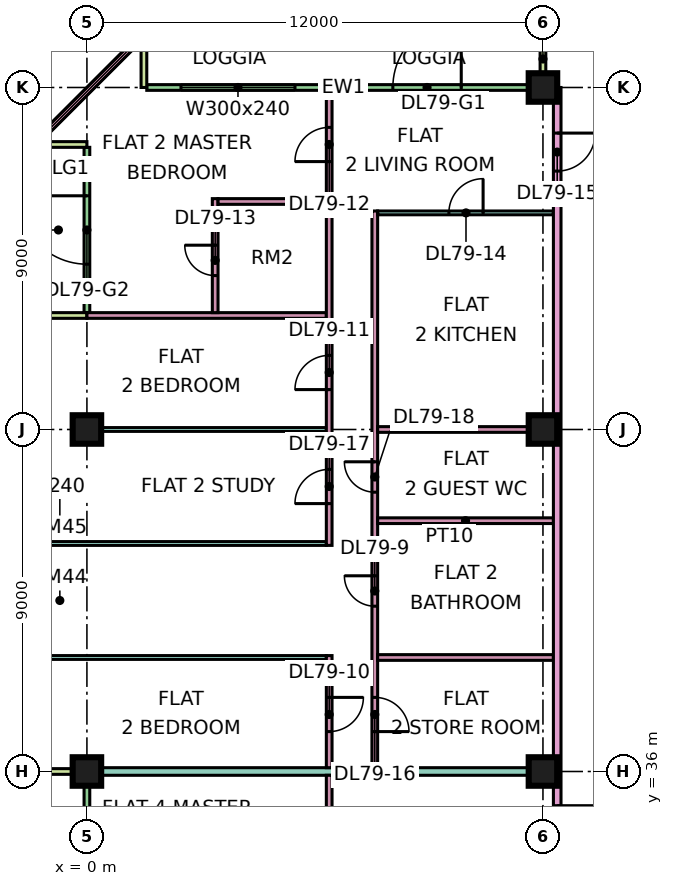
"""IFC4 building model, lengths in metres.
Left out: names, types, materials, properties, quantities, classifications, styles, units other than length and angle.
Written with IfcOpenShell. Run it as: python <this file> out.ifc"""

import sys

from ifc_helpers import new_model, si_unit, direction, frame, frame_2d, origin, origin_2d, place, context, subcontext, project, spatial, rectangle, extrude, element, fill, save


model = new_model("IFC4")
c1 = context("Model", 3, precision=1e-05, world=origin(), true_north=direction((0.0, 1.0)))
c2 = subcontext(c1, "Body", "Model", "MODEL_VIEW")
j1 = project(units=[si_unit("LENGTHUNIT", "METRE"), si_unit("PLANEANGLEUNIT", "RADIAN")], contexts=[c1])
p1 = place(None, origin())
s1 = spatial("IfcSite", under=j1, at=p1, CompositionType="ELEMENT")
p2 = place(p1, origin())
s2 = spatial("IfcBuilding", under=s1, at=p2, CompositionType="ELEMENT")
p3 = place(p2, frame((0.0, 0.0, 342.65)))
s3 = spatial("IfcBuildingStorey", under=s2, at=p3, CompositionType="ELEMENT", Elevation=342.65)
p4 = place(p3, frame((0.0, 36.0, 0.0), z_axis=(0.0, 0.0, 1.0), x_axis=(1.0, 0.0, 0.0)))
e1 = element("IfcColumn", 1, at=p4, inside=s3, PredefinedType="COLUMN", context=c2, shape_type="SweptSolid", body=[
    extrude(rectangle(XDim=0.75, YDim=0.75, at=origin_2d()), origin(), (0.0, 0.0, 1.0), 3.75),
])
p5 = place(p3, frame((0.0, 45.0, 0.0), z_axis=(0.0, 0.0, 1.0), x_axis=(1.0, 0.0, 0.0)))
e2 = element("IfcColumn", 2, at=p5, inside=s3, PredefinedType="COLUMN", context=c2, shape_type="SweptSolid", body=[
    extrude(rectangle(XDim=0.75, YDim=0.75, at=origin_2d()), origin(), (0.0, 0.0, 1.0), 3.75),
])
for number, where, z_axis, x_axis in (
    (3, (12.0, 36.0, 0.0), (0.0, 0.0, 1.0), (1.0, 0.0, 0.0)),
    (4, (12.0, 45.0, 0.0), (0.0, 0.0, 1.0), (1.0, 0.0, 0.0)),
    (5, (12.0, 54.0, 0.0), (0.0, 0.0, 1.0), (1.0, 0.0, 0.0)),
):
    element("IfcColumn", number, at=place(p3, frame(where, z_axis=z_axis, x_axis=x_axis)), inside=s3, PredefinedType="COLUMN", context=c2, shape_type="SweptSolid", body=[
        extrude(rectangle(XDim=0.75, YDim=0.75, at=origin_2d()), origin(), (0.0, 0.0, 1.0), 3.75),
    ])
p6 = place(p3, frame((11.925, 54.0, 0.0), z_axis=(0.0, 0.0, 1.0), x_axis=(-1.0, 0.0, 0.0)))
e6 = element("IfcWall", 6, at=p6, inside=s3, PredefinedType="SOLIDWALL", context=c2, shape_type="SweptSolid", body=[
    extrude(rectangle(XDim=10.35, YDim=0.15, at=frame_2d((5.175, 0.0))), origin(), (0.0, 0.0, 1.0), 3.35),
])
p7 = place(p6, frame((2.075, 0.0, 0.0)))
e7 = element("IfcOpeningElement", 7, at=p7, cuts=e6, PredefinedType="OPENING", context=c2, shape_type="SweptSolid", body=[
    extrude(rectangle(XDim=1.8, YDim=2.4, at=frame_2d((0.9, 1.2))), frame((0.0, 0.085, 0.0), z_axis=(0.0, -1.0, 0.0), x_axis=(1.0, 0.0, 0.0)), (0.0, 0.0, 1.0), 0.17),
])
p8 = place(p6, frame((6.45, 0.0, 0.45)))
e8 = element("IfcOpeningElement", 8, at=p8, cuts=e6, PredefinedType="OPENING", context=c2, shape_type="SweptSolid", body=[
    extrude(rectangle(XDim=3.0, YDim=2.4, at=frame_2d((1.5, 1.2))), frame((0.0, 0.085, 0.0), z_axis=(0.0, -1.0, 0.0), x_axis=(1.0, 0.0, 0.0)), (0.0, 0.0, 1.0), 0.17),
])
for number, where, z_axis, x_axis in (
    (9, (12.0, 55.5, 0.0), (0.0, 0.0, 1.0), (0.0, -1.0, 0.0)),
    (10, (1.5, 55.5, 0.0), (0.0, 0.0, 1.0), (0.0, -1.0, 0.0)),
):
    element("IfcWall", number, at=place(p3, frame(where, z_axis=z_axis, x_axis=x_axis)), inside=s3, PredefinedType="SOLIDWALL", context=c2, shape_type="SweptSolid", body=[
        extrude(rectangle(XDim=1.5, YDim=0.15, at=frame_2d((0.75, 0.0))), origin(), (0.0, 0.0, 1.0), 3.35),
    ])
p9 = place(p3, frame((1.553, 55.447, 0.0), z_axis=(0.0, 0.0, 1.0), x_axis=(-0.707106781187, -0.707106781187, 0.0)))
e11 = element("IfcWall", 11, at=p9, inside=s3, PredefinedType="SOLIDWALL", context=c2, shape_type="SweptSolid", body=[
    extrude(rectangle(XDim=4.243, YDim=0.15, at=frame_2d((2.121, 0.0))), origin(), (0.0, 0.0, 1.0), 3.35),
])
p10 = place(p9, frame((0.621, 0.0, 0.45)))
e12 = element("IfcOpeningElement", 12, at=p10, cuts=e11, PredefinedType="OPENING", context=c2, shape_type="SweptSolid", body=[
    extrude(rectangle(XDim=3.0, YDim=2.4, at=frame_2d((1.5, 1.2))), frame((0.0, 0.085, 0.0), z_axis=(0.0, -1.0, 0.0), x_axis=(1.0, 0.0, 0.0)), (0.0, 0.0, 1.0), 0.17),
])
p11 = place(p3, frame((0.0, 52.425, 0.0), z_axis=(0.0, 0.0, 1.0), x_axis=(0.0, -1.0, 0.0)))
e13 = element("IfcWall", 13, at=p11, inside=s3, PredefinedType="SOLIDWALL", context=c2, shape_type="SweptSolid", body=[
    extrude(rectangle(XDim=4.35, YDim=0.15, at=frame_2d((2.175, 0.0))), origin(), (0.0, 0.0, 1.0), 3.35),
])
p12 = place(p11, frame((1.275, 0.0, 0.0)))
e14 = element("IfcOpeningElement", 14, at=p12, cuts=e13, PredefinedType="OPENING", context=c2, shape_type="SweptSolid", body=[
    extrude(rectangle(XDim=1.8, YDim=2.4, at=frame_2d((0.9, 1.2))), frame((0.0, 0.085, 0.0), z_axis=(0.0, -1.0, 0.0), x_axis=(1.0, 0.0, 0.0)), (0.0, 0.0, 1.0), 0.17),
])
for number, where, z_axis, x_axis in (
    (15, (-1.5, 52.5, 0.0), (0.0, 0.0, 1.0), (1.0, 0.0, 0.0)),
    (16, (-1.5, 48.0, 0.0), (0.0, 0.0, 1.0), (1.0, 0.0, 0.0)),
):
    element("IfcWall", number, at=place(p3, frame(where, z_axis=z_axis, x_axis=x_axis)), inside=s3, PredefinedType="SOLIDWALL", context=c2, shape_type="SweptSolid", body=[
        extrude(rectangle(XDim=1.5, YDim=0.15, at=frame_2d((0.75, 0.0))), origin(), (0.0, 0.0, 1.0), 3.35),
    ])
p13 = place(p3, frame((0.0, 35.925, 0.0), z_axis=(0.0, 0.0, 1.0), x_axis=(0.0, -1.0, 0.0)))
e17 = element("IfcWall", 17, at=p13, inside=s3, PredefinedType="SOLIDWALL", context=c2, shape_type="SweptSolid", body=[
    extrude(rectangle(XDim=11.85, YDim=0.15, at=frame_2d((5.925, 0.0))), origin(), (0.0, 0.0, 1.0), 3.35),
])
p14 = place(p13, frame((2.262, 0.0, 0.0)))
e18 = element("IfcOpeningElement", 18, at=p14, cuts=e17, PredefinedType="OPENING", context=c2, shape_type="SweptSolid", body=[
    extrude(rectangle(XDim=1.8, YDim=2.4, at=frame_2d((0.9, 1.2))), frame((0.0, 0.085, 0.0), z_axis=(0.0, -1.0, 0.0), x_axis=(1.0, 0.0, 0.0)), (0.0, 0.0, 1.0), 0.17),
])
p15 = place(p13, frame((7.188, 0.0, 0.45)))
e19 = element("IfcOpeningElement", 19, at=p15, cuts=e17, PredefinedType="OPENING", context=c2, shape_type="SweptSolid", body=[
    extrude(rectangle(XDim=3.0, YDim=2.4, at=frame_2d((1.5, 1.2))), frame((0.0, 0.085, 0.0), z_axis=(0.0, -1.0, 0.0), x_axis=(1.0, 0.0, 0.0)), (0.0, 0.0, 1.0), 0.17),
])
p16 = place(p3, frame((-1.5, 36.0, 0.0), z_axis=(0.0, 0.0, 1.0), x_axis=(1.0, 0.0, 0.0)))
e20 = element("IfcWall", 20, at=p16, inside=s3, PredefinedType="SOLIDWALL", context=c2, shape_type="SweptSolid", body=[
    extrude(rectangle(XDim=1.5, YDim=0.15, at=frame_2d((0.75, 0.0))), origin(), (0.0, 0.0, 1.0), 3.35),
])
e21 = element("IfcWall", 21, at=p4, inside=s3, PredefinedType="PARTITIONING", context=c2, shape_type="SweptSolid", body=[
    extrude(rectangle(XDim=12.275, YDim=0.2, at=frame_2d((6.137, 0.0))), origin(), (0.0, 0.0, 1.0), 3.35),
])
for number, where, z_axis, x_axis in (
    (22, (-1.35, 39.0, 0.0), (0.0, 0.0, 1.0), (1.0, 0.0, 0.0)),
    (23, (-1.35, 42.0, 0.0), (0.0, 0.0, 1.0), (1.0, 0.0, 0.0)),
):
    element("IfcWall", number, at=place(p3, frame(where, z_axis=z_axis, x_axis=x_axis)), inside=s3, PredefinedType="PARTITIONING", context=c2, shape_type="SweptSolid", body=[
        extrude(rectangle(XDim=7.65, YDim=0.1, at=frame_2d((3.825, 0.0))), origin(), (0.0, 0.0, 1.0), 3.35),
    ])
e24 = element("IfcWall", 24, at=p5, inside=s3, PredefinedType="PARTITIONING", context=c2, shape_type="SweptSolid", body=[
    extrude(rectangle(XDim=6.3, YDim=0.1, at=frame_2d((3.15, 0.0))), origin(), (0.0, 0.0, 1.0), 3.35),
])
p17 = place(p3, frame((0.0, 48.0, 0.0), z_axis=(0.0, 0.0, 1.0), x_axis=(1.0, 0.0, 0.0)))
e25 = element("IfcWall", 25, at=p17, inside=s3, PredefinedType="PARTITIONING", context=c2, shape_type="SweptSolid", body=[
    extrude(rectangle(XDim=6.3, YDim=0.15, at=frame_2d((3.15, 0.0))), origin(), (0.0, 0.0, 1.0), 3.35),
])
p18 = place(p3, frame((3.375, 48.075, 0.0), z_axis=(0.0, 0.0, 1.0), x_axis=(0.0, 1.0, 0.0)))
e26 = element("IfcWall", 26, at=p18, inside=s3, PredefinedType="PARTITIONING", context=c2, shape_type="SweptSolid", body=[
    extrude(rectangle(XDim=3.0, YDim=0.15, at=frame_2d((1.5, 0.0))), origin(), (0.0, 0.0, 1.0), 3.35),
])
p19 = place(p18, frame((0.975, 0.0, 0.0)))
e27 = element("IfcOpeningElement", 27, at=p19, cuts=e26, PredefinedType="OPENING", context=c2, shape_type="SweptSolid", body=[
    extrude(rectangle(XDim=0.8, YDim=2.1, at=frame_2d((0.4, 1.05))), frame((0.0, 0.085, 0.0), z_axis=(0.0, -1.0, 0.0), x_axis=(1.0, 0.0, 0.0)), (0.0, 0.0, 1.0), 0.17),
])
p20 = place(p3, frame((3.45, 51.0, 0.0), z_axis=(0.0, 0.0, 1.0), x_axis=(1.0, 0.0, 0.0)))
e28 = element("IfcWall", 28, at=p20, inside=s3, PredefinedType="PARTITIONING", context=c2, shape_type="SweptSolid", body=[
    extrude(rectangle(XDim=2.85, YDim=0.15, at=frame_2d((1.425, 0.0))), origin(), (0.0, 0.0, 1.0), 3.35),
])
p21 = place(p3, frame((6.375, 30.075, 0.0), z_axis=(0.0, 0.0, 1.0), x_axis=(0.0, 1.0, 0.0)))
e29 = element("IfcWall", 29, at=p21, inside=s3, PredefinedType="PARTITIONING", context=c2, shape_type="SweptSolid", body=[
    extrude(rectangle(XDim=5.825, YDim=0.15, at=frame_2d((2.913, 0.0))), origin(), (0.0, 0.0, 1.0), 3.35),
])
p22 = place(p21, frame((3.975, 0.0, 0.0)))
e30 = element("IfcOpeningElement", 30, at=p22, cuts=e29, PredefinedType="OPENING", context=c2, shape_type="SweptSolid", body=[
    extrude(rectangle(XDim=0.9, YDim=2.1, at=frame_2d((0.45, 1.05))), frame((0.0, 0.085, 0.0), z_axis=(0.0, -1.0, 0.0), x_axis=(1.0, 0.0, 0.0)), (0.0, 0.0, 1.0), 0.17),
])
p23 = place(p3, frame((6.375, 36.1, 0.0), z_axis=(0.0, 0.0, 1.0), x_axis=(0.0, 1.0, 0.0)))
e31 = element("IfcWall", 31, at=p23, inside=s3, PredefinedType="PARTITIONING", context=c2, shape_type="SweptSolid", body=[
    extrude(rectangle(XDim=2.95, YDim=0.15, at=frame_2d((1.475, 0.0))), origin(), (0.0, 0.0, 1.0), 3.35),
])
p24 = place(p23, frame((0.95, 0.0, 0.0)))
e32 = element("IfcOpeningElement", 32, at=p24, cuts=e31, PredefinedType="OPENING", context=c2, shape_type="SweptSolid", body=[
    extrude(rectangle(XDim=0.9, YDim=2.1, at=frame_2d((0.45, 1.05))), frame((0.0, 0.085, 0.0), z_axis=(0.0, -1.0, 0.0), x_axis=(1.0, 0.0, 0.0)), (0.0, 0.0, 1.0), 0.17),
])
p25 = place(p3, frame((6.375, 41.95, 0.0), z_axis=(0.0, 0.0, 1.0), x_axis=(0.0, 1.0, 0.0)))
e33 = element("IfcWall", 33, at=p25, inside=s3, PredefinedType="PARTITIONING", context=c2, shape_type="SweptSolid", body=[
    extrude(rectangle(XDim=11.976, YDim=0.15, at=frame_2d((5.988, 0.0))), origin(), (0.0, 0.0, 1.0), 3.35),
])
p26 = place(p25, frame((4.1, 0.0, 0.0)))
e34 = element("IfcOpeningElement", 34, at=p26, cuts=e33, PredefinedType="OPENING", context=c2, shape_type="SweptSolid", body=[
    extrude(rectangle(XDim=0.9, YDim=2.1, at=frame_2d((0.45, 1.05))), frame((0.0, 0.085, 0.0), z_axis=(0.0, -1.0, 0.0), x_axis=(1.0, 0.0, 0.0)), (0.0, 0.0, 1.0), 0.17),
])
p27 = place(p25, frame((10.1, 0.0, 0.0)))
e35 = element("IfcOpeningElement", 35, at=p27, cuts=e33, PredefinedType="OPENING", context=c2, shape_type="SweptSolid", body=[
    extrude(rectangle(XDim=0.9, YDim=2.1, at=frame_2d((0.45, 1.05))), frame((0.0, 0.085, 0.0), z_axis=(0.0, -1.0, 0.0), x_axis=(1.0, 0.0, 0.0)), (0.0, 0.0, 1.0), 0.17),
])
p28 = place(p25, frame((1.1, 0.0, 0.0)))
e36 = element("IfcOpeningElement", 36, at=p28, cuts=e33, PredefinedType="OPENING", context=c2, shape_type="SweptSolid", body=[
    extrude(rectangle(XDim=0.9, YDim=2.1, at=frame_2d((0.45, 1.05))), frame((0.0, 0.085, 0.0), z_axis=(0.0, -1.0, 0.0), x_axis=(1.0, 0.0, 0.0)), (0.0, 0.0, 1.0), 0.17),
])
p29 = place(p3, frame((7.575, 36.1, 0.0), z_axis=(0.0, 0.0, 1.0), x_axis=(0.0, 1.0, 0.0)))
e37 = element("IfcWall", 37, at=p29, inside=s3, PredefinedType="PARTITIONING", context=c2, shape_type="SweptSolid", body=[
    extrude(rectangle(XDim=14.65, YDim=0.15, at=frame_2d((7.325, 0.0))), origin(), (0.0, 0.0, 1.0), 3.35),
])
p30 = place(p29, frame((4.25, 0.0, 0.0)))
e38 = element("IfcOpeningElement", 38, at=p30, cuts=e37, PredefinedType="OPENING", context=c2, shape_type="SweptSolid", body=[
    extrude(rectangle(XDim=0.8, YDim=2.1, at=frame_2d((0.4, 1.05))), frame((0.0, 0.085, 0.0), z_axis=(0.0, -1.0, 0.0), x_axis=(1.0, 0.0, 0.0)), (0.0, 0.0, 1.0), 0.17),
])
p31 = place(p29, frame((0.95, 0.0, 0.0)))
e39 = element("IfcOpeningElement", 39, at=p31, cuts=e37, PredefinedType="OPENING", context=c2, shape_type="SweptSolid", body=[
    extrude(rectangle(XDim=0.9, YDim=2.1, at=frame_2d((0.45, 1.05))), frame((0.0, 0.085, 0.0), z_axis=(0.0, -1.0, 0.0), x_axis=(1.0, 0.0, 0.0)), (0.0, 0.0, 1.0), 0.17),
])
p32 = place(p29, frame((7.25, 0.0, 0.0)))
e40 = element("IfcOpeningElement", 40, at=p32, cuts=e37, PredefinedType="OPENING", context=c2, shape_type="SweptSolid", body=[
    extrude(rectangle(XDim=0.8, YDim=2.1, at=frame_2d((0.4, 1.05))), frame((0.0, 0.085, 0.0), z_axis=(0.0, -1.0, 0.0), x_axis=(1.0, 0.0, 0.0)), (0.0, 0.0, 1.0), 0.17),
])
for number, where, z_axis, x_axis in (
    (41, (7.65, 39.0, 0.0), (0.0, 0.0, 1.0), (1.0, 0.0, 0.0)),
    (42, (7.65, 42.6, 0.0), (0.0, 0.0, 1.0), (1.0, 0.0, 0.0)),
    (43, (7.65, 45.0, 0.0), (0.0, 0.0, 1.0), (1.0, 0.0, 0.0)),
):
    element("IfcWall", number, at=place(p3, frame(where, z_axis=z_axis, x_axis=x_axis)), inside=s3, PredefinedType="PARTITIONING", context=c2, shape_type="SweptSolid", body=[
        extrude(rectangle(XDim=4.625, YDim=0.15, at=frame_2d((2.312, 0.0))), origin(), (0.0, 0.0, 1.0), 3.35),
    ])
p33 = place(p3, frame((7.65, 50.7, 0.0), z_axis=(0.0, 0.0, 1.0), x_axis=(1.0, 0.0, 0.0)))
e44 = element("IfcWall", 44, at=p33, inside=s3, PredefinedType="PARTITIONING", context=c2, shape_type="SweptSolid", body=[
    extrude(rectangle(XDim=4.625, YDim=0.1, at=frame_2d((2.312, 0.0))), origin(), (0.0, 0.0, 1.0), 3.35),
])
p34 = place(p33, frame((1.875, 0.0, 0.0)))
e45 = element("IfcOpeningElement", 45, at=p34, cuts=e44, PredefinedType="OPENING", context=c2, shape_type="SweptSolid", body=[
    extrude(rectangle(XDim=0.9, YDim=2.1, at=frame_2d((0.45, 1.05))), frame((0.0, 0.06, 0.0), z_axis=(0.0, -1.0, 0.0), x_axis=(1.0, 0.0, 0.0)), (0.0, 0.0, 1.0), 0.12),
])
p35 = place(p3, frame((12.375, 20.0, 0.0), z_axis=(0.0, 0.0, 1.0), x_axis=(0.0, 1.0, 0.0)))
e46 = element("IfcWall", 46, at=p35, inside=s3, PredefinedType="PARTITIONING", context=c2, shape_type="SweptSolid", body=[
    extrude(rectangle(XDim=34.0, YDim=0.2, at=frame_2d((17.0, 0.0))), origin(), (0.0, 0.0, 1.0), 3.35),
])
p36 = place(p35, frame((31.8, 0.0, 0.0)))
e47 = element("IfcOpeningElement", 47, at=p36, cuts=e46, PredefinedType="OPENING", context=c2, shape_type="SweptSolid", body=[
    extrude(rectangle(XDim=1.0, YDim=2.1, at=frame_2d((0.5, 1.05))), frame((0.0, 0.11, 0.0), z_axis=(0.0, -1.0, 0.0), x_axis=(1.0, 0.0, 0.0)), (0.0, 0.0, 1.0), 0.22),
])
p37 = place(p35, frame((0.6, 0.0, 0.0)))
e48 = element("IfcOpeningElement", 48, at=p37, cuts=e46, PredefinedType="OPENING", context=c2, shape_type="SweptSolid", body=[
    extrude(rectangle(XDim=1.2, YDim=2.1, at=frame_2d((0.6, 1.05))), frame((0.0, 0.11, 0.0), z_axis=(0.0, -1.0, 0.0), x_axis=(1.0, 0.0, 0.0)), (0.0, 0.0, 1.0), 0.22),
])
p38 = place(p35, frame((14.1, 0.0, 0.0)))
e49 = element("IfcOpeningElement", 49, at=p38, cuts=e46, PredefinedType="OPENING", context=c2, shape_type="SweptSolid", body=[
    extrude(rectangle(XDim=1.0, YDim=2.1, at=frame_2d((0.5, 1.05))), frame((0.0, 0.11, 0.0), z_axis=(0.0, -1.0, 0.0), x_axis=(1.0, 0.0, 0.0)), (0.0, 0.0, 1.0), 0.22),
])
p39 = place(p7, frame((1.8, 0.0, 0.0), z_axis=(0.0, 0.0, 1.0), x_axis=(-1.0, 0.0, 0.0)))
e50 = element("IfcDoor", 50, at=p39, inside=s3, OperationType="DOUBLE_DOOR_SINGLE_SWING", PredefinedType="DOOR", context=c2, shape_type="SweptSolid", body=[
    extrude(rectangle(XDim=1.8, YDim=2.4, at=frame_2d((0.9, 1.2))), frame((0.0, 0.025, 0.0), z_axis=(0.0, -1.0, 0.0), x_axis=(1.0, 0.0, 0.0)), (0.0, 0.0, 1.0), 0.05),
])
fill(e7, e50)
p40 = place(p8, origin())
e51 = element("IfcWindow", 51, at=p40, inside=s3, PartitioningType="SINGLE_PANEL", PredefinedType="WINDOW", context=c2, shape_type="SweptSolid", body=[
    extrude(rectangle(XDim=3.0, YDim=2.4, at=frame_2d((1.5, 1.2))), frame((0.0, 0.03, 0.0), z_axis=(0.0, -1.0, 0.0), x_axis=(1.0, 0.0, 0.0)), (0.0, 0.0, 1.0), 0.06),
])
fill(e8, e51)
p41 = place(p10, origin())
e52 = element("IfcWindow", 52, at=p41, inside=s3, PartitioningType="SINGLE_PANEL", PredefinedType="WINDOW", context=c2, shape_type="SweptSolid", body=[
    extrude(rectangle(XDim=3.0, YDim=2.4, at=frame_2d((1.5, 1.2))), frame((0.0, 0.03, 0.0), z_axis=(0.0, -1.0, 0.0), x_axis=(1.0, 0.0, 0.0)), (0.0, 0.0, 1.0), 0.06),
])
fill(e12, e52)
p42 = place(p12, frame((1.8, 0.0, 0.0), z_axis=(0.0, 0.0, 1.0), x_axis=(-1.0, 0.0, 0.0)))
e53 = element("IfcDoor", 53, at=p42, inside=s3, OperationType="DOUBLE_DOOR_SINGLE_SWING", PredefinedType="DOOR", context=c2, shape_type="SweptSolid", body=[
    extrude(rectangle(XDim=1.8, YDim=2.4, at=frame_2d((0.9, 1.2))), frame((0.0, 0.025, 0.0), z_axis=(0.0, -1.0, 0.0), x_axis=(1.0, 0.0, 0.0)), (0.0, 0.0, 1.0), 0.05),
])
fill(e14, e53)
p43 = place(p30, frame((0.8, 0.0, 0.0), z_axis=(0.0, 0.0, 1.0), x_axis=(-1.0, 0.0, 0.0)))
e54 = element("IfcDoor", 54, at=p43, inside=s3, OperationType="SINGLE_SWING_RIGHT", PredefinedType="DOOR", context=c2, shape_type="SweptSolid", body=[
    extrude(rectangle(XDim=0.8, YDim=2.1, at=frame_2d((0.4, 1.05))), frame((0.0, 0.025, 0.0), z_axis=(0.0, -1.0, 0.0), x_axis=(1.0, 0.0, 0.0)), (0.0, 0.0, 1.0), 0.05),
])
fill(e38, e54)
p44 = place(p24, origin())
e55 = element("IfcDoor", 55, at=p44, inside=s3, OperationType="SINGLE_SWING_RIGHT", PredefinedType="DOOR", context=c2, shape_type="SweptSolid", body=[
    extrude(rectangle(XDim=0.9, YDim=2.1, at=frame_2d((0.45, 1.05))), frame((0.0, 0.025, 0.0), z_axis=(0.0, -1.0, 0.0), x_axis=(1.0, 0.0, 0.0)), (0.0, 0.0, 1.0), 0.05),
])
fill(e32, e55)
p45 = place(p26, origin())
e56 = element("IfcDoor", 56, at=p45, inside=s3, OperationType="SINGLE_SWING_LEFT", PredefinedType="DOOR", context=c2, shape_type="SweptSolid", body=[
    extrude(rectangle(XDim=0.9, YDim=2.1, at=frame_2d((0.45, 1.05))), frame((0.0, 0.025, 0.0), z_axis=(0.0, -1.0, 0.0), x_axis=(1.0, 0.0, 0.0)), (0.0, 0.0, 1.0), 0.05),
])
fill(e34, e56)
p46 = place(p27, origin())
e57 = element("IfcDoor", 57, at=p46, inside=s3, OperationType="SINGLE_SWING_LEFT", PredefinedType="DOOR", context=c2, shape_type="SweptSolid", body=[
    extrude(rectangle(XDim=0.9, YDim=2.1, at=frame_2d((0.45, 1.05))), frame((0.0, 0.025, 0.0), z_axis=(0.0, -1.0, 0.0), x_axis=(1.0, 0.0, 0.0)), (0.0, 0.0, 1.0), 0.05),
])
fill(e35, e57)
p47 = place(p19, frame((0.8, 0.0, 0.0), z_axis=(0.0, 0.0, 1.0), x_axis=(-1.0, 0.0, 0.0)))
e58 = element("IfcDoor", 58, at=p47, inside=s3, OperationType="SINGLE_SWING_RIGHT", PredefinedType="DOOR", context=c2, shape_type="SweptSolid", body=[
    extrude(rectangle(XDim=0.8, YDim=2.1, at=frame_2d((0.4, 1.05))), frame((0.0, 0.025, 0.0), z_axis=(0.0, -1.0, 0.0), x_axis=(1.0, 0.0, 0.0)), (0.0, 0.0, 1.0), 0.05),
])
fill(e27, e58)
p48 = place(p34, frame((0.9, 0.0, 0.0), z_axis=(0.0, 0.0, 1.0), x_axis=(-1.0, 0.0, 0.0)))
e59 = element("IfcDoor", 59, at=p48, inside=s3, OperationType="SINGLE_SWING_RIGHT", PredefinedType="DOOR", context=c2, shape_type="SweptSolid", body=[
    extrude(rectangle(XDim=0.9, YDim=2.1, at=frame_2d((0.45, 1.05))), frame((0.0, 0.025, 0.0), z_axis=(0.0, -1.0, 0.0), x_axis=(1.0, 0.0, 0.0)), (0.0, 0.0, 1.0), 0.05),
])
fill(e45, e59)
p49 = place(p36, origin())
e60 = element("IfcDoor", 60, at=p49, inside=s3, OperationType="SINGLE_SWING_RIGHT", PredefinedType="DOOR", context=c2, shape_type="SweptSolid", body=[
    extrude(rectangle(XDim=1.0, YDim=2.1, at=frame_2d((0.5, 1.05))), frame((0.0, 0.025, 0.0), z_axis=(0.0, -1.0, 0.0), x_axis=(1.0, 0.0, 0.0)), (0.0, 0.0, 1.0), 0.05),
])
fill(e47, e60)
p50 = place(p31, frame((0.9, 0.0, 0.0), z_axis=(0.0, 0.0, 1.0), x_axis=(-1.0, 0.0, 0.0)))
e61 = element("IfcDoor", 61, at=p50, inside=s3, OperationType="SINGLE_SWING_LEFT", PredefinedType="DOOR", context=c2, shape_type="SweptSolid", body=[
    extrude(rectangle(XDim=0.9, YDim=2.1, at=frame_2d((0.45, 1.05))), frame((0.0, 0.025, 0.0), z_axis=(0.0, -1.0, 0.0), x_axis=(1.0, 0.0, 0.0)), (0.0, 0.0, 1.0), 0.05),
])
fill(e39, e61)
p51 = place(p28, origin())
e62 = element("IfcDoor", 62, at=p51, inside=s3, OperationType="SINGLE_SWING_LEFT", PredefinedType="DOOR", context=c2, shape_type="SweptSolid", body=[
    extrude(rectangle(XDim=0.9, YDim=2.1, at=frame_2d((0.45, 1.05))), frame((0.0, 0.025, 0.0), z_axis=(0.0, -1.0, 0.0), x_axis=(1.0, 0.0, 0.0)), (0.0, 0.0, 1.0), 0.05),
])
fill(e36, e62)
p52 = place(p32, frame((0.8, 0.0, 0.0), z_axis=(0.0, 0.0, 1.0), x_axis=(-1.0, 0.0, 0.0)))
e63 = element("IfcDoor", 63, at=p52, inside=s3, OperationType="SINGLE_SWING_RIGHT", PredefinedType="DOOR", context=c2, shape_type="SweptSolid", body=[
    extrude(rectangle(XDim=0.8, YDim=2.1, at=frame_2d((0.4, 1.05))), frame((0.0, 0.025, 0.0), z_axis=(0.0, -1.0, 0.0), x_axis=(1.0, 0.0, 0.0)), (0.0, 0.0, 1.0), 0.05),
])
fill(e40, e63)
p53 = place(p38, origin())
e64 = element("IfcDoor", 64, at=p53, inside=s3, OperationType="SINGLE_SWING_RIGHT", PredefinedType="DOOR", context=c2, shape_type="SweptSolid", body=[
    extrude(rectangle(XDim=1.0, YDim=2.1, at=frame_2d((0.5, 1.05))), frame((0.0, 0.025, 0.0), z_axis=(0.0, -1.0, 0.0), x_axis=(1.0, 0.0, 0.0)), (0.0, 0.0, 1.0), 0.05),
])
fill(e49, e64)
save(model, sys.argv[1])
